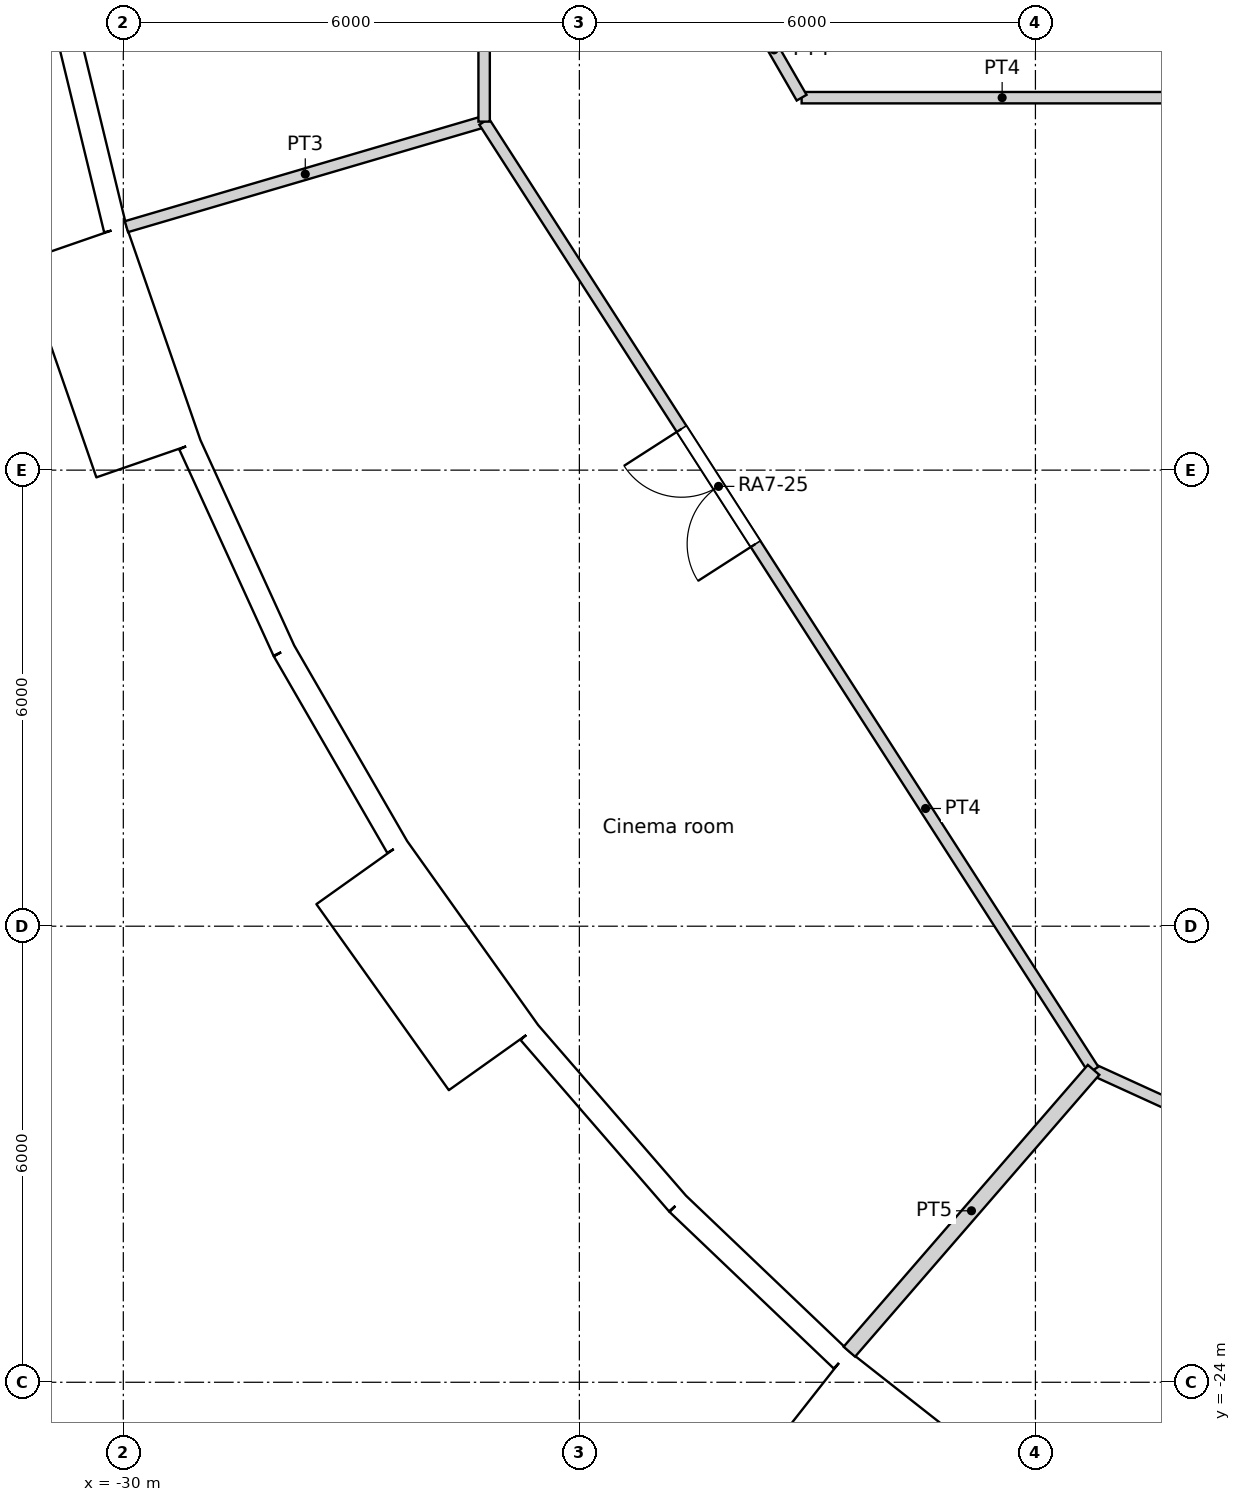
"""IFC4 building model, lengths in metres.
Left out: names, types, materials, properties, quantities, classifications, styles, units other than length and angle.
Written with IfcOpenShell. Run it as: python <this file> out.ifc"""

import sys

from ifc_helpers import new_model, si_unit, direction, frame, frame_2d, origin, origin_2d, place, context, subcontext, project, spatial, rectangle, circle, extrude, element, fill, save


model = new_model("IFC4")
c1 = context("Model", 3, precision=1e-05, world=origin(), true_north=direction((0.0, 1.0)))
c2 = subcontext(c1, "Body", "Model", "MODEL_VIEW")
j1 = project(units=[si_unit("LENGTHUNIT", "METRE"), si_unit("PLANEANGLEUNIT", "RADIAN")], contexts=[c1])
p1 = place(None, origin())
s1 = spatial("IfcSite", under=j1, at=p1, CompositionType="ELEMENT")
p2 = place(p1, origin())
s2 = spatial("IfcBuilding", under=s1, at=p2, CompositionType="ELEMENT")
p3 = place(p2, frame((0.0, 0.0, 93.0)))
s3 = spatial("IfcBuildingStorey", under=s2, at=p3, CompositionType="ELEMENT", Elevation=93.0)
for number, where, z_axis, x_axis in (
    (1, (-29.048, -8.529, 0.0), (0.0, 0.0, 1.0), (1.0, 0.0, 0.0)),
    (2, (-26.909, -13.873, 0.0), (0.0, 0.0, 1.0), (1.0, 0.0, 0.0)),
    (3, (-23.797, -18.715, 0.0), (0.0, 0.0, 1.0), (1.0, 0.0, 0.0)),
    (4, (-19.826, -22.88, 0.0), (0.0, 0.0, 1.0), (1.0, 0.0, 0.0)),
):
    element("IfcColumn", number, at=place(p3, frame(where, z_axis=z_axis, x_axis=x_axis)), inside=s3, PredefinedType="COLUMN", context=c2, shape_type="SweptSolid", body=[
        extrude(circle(Radius=0.6, at=origin_2d()), origin(), (0.0, 0.0, 1.0), 3.6),
    ])
for number, where, z_axis, x_axis in (
    (5, (-23.067, -8.396, 0.0), (0.0, 0.0, 1.0), (1.0, 0.0, 0.0)),
    (6, (-20.509, -13.489, 0.0), (0.0, 0.0, 1.0), (1.0, 0.0, 0.0)),
    (7, (-16.846, -17.855, 0.0), (0.0, 0.0, 1.0), (1.0, 0.0, 0.0)),
):
    element("IfcColumn", number, at=place(p3, frame(where, z_axis=z_axis, x_axis=x_axis)), inside=s3, PredefinedType="COLUMN", context=c2, shape_type="SweptSolid", body=[
        extrude(circle(Radius=0.65, at=origin_2d()), origin(), (0.0, 0.0, 1.0), 3.6),
    ])
p4 = place(p3, frame((-16.958, -8.167, 0.0), z_axis=(0.0, 0.0, 1.0), x_axis=(1.0, 0.0, 0.0)))
e8 = element("IfcColumn", 8, at=p4, inside=s3, PredefinedType="COLUMN", context=c2, shape_type="SweptSolid", body=[
    extrude(circle(Radius=0.7, at=origin_2d()), origin(), (0.0, 0.0, 1.0), 3.6),
])
p5 = place(p3, frame((-30.807, -5.938, 0.0), z_axis=(0.0, 0.0, 1.0), x_axis=(0.235743081534, -0.971815414319, 0.0)))
e9 = element("IfcWall", 9, at=p5, inside=s3, PredefinedType="SOLIDWALL", context=c2, shape_type="SweptSolid", body=[
    extrude(rectangle(XDim=2.979, YDim=0.3, at=frame_2d((1.49, 0.0))), origin(), (0.0, 0.0, 1.0), 3.15),
])
p6 = place(p5, frame((1.49, 0.0, 1.55)))
e10 = element("IfcOpeningElement", 10, at=p6, cuts=e9, PredefinedType="OPENING", context=c2, shape_type="SweptSolid", body=[
    extrude(circle(Radius=0.9, at=origin_2d()), frame((0.0, 0.16, 0.0), z_axis=(0.0, -1.0, 0.0), x_axis=(1.0, 0.0, 0.0)), (0.0, 0.0, 1.0), 0.32),
])
p7 = place(p3, frame((-30.649, -9.021, -0.45), z_axis=(0.0, 0.0, 1.0), x_axis=(0.327071431777, -0.944999618262, 0.0)))
e11 = element("IfcWall", 11, at=p7, inside=s3, PredefinedType="ELEMENTEDWALL", context=c2, shape_type="SweptSolid", body=[
    extrude(rectangle(XDim=3.0, YDim=1.45, at=frame_2d((1.5, 0.0))), origin(), (0.0, 0.0, 1.0), 3.6),
])
p8 = place(p7, frame((1.5, 0.0, 2.0)))
e12 = element("IfcOpeningElement", 12, at=p8, cuts=e11, PredefinedType="OPENING", context=c2, shape_type="SweptSolid", body=[
    extrude(circle(Radius=0.9, at=origin_2d()), frame((0.0, 0.735, 0.0), z_axis=(0.0, -1.0, 0.0), x_axis=(1.0, 0.0, 0.0)), (0.0, 0.0, 1.0), 1.47),
])
p9 = place(p3, frame((-29.125, -11.666, 0.0), z_axis=(0.0, 0.0, 1.0), x_axis=(0.415407317162, -0.909635509888, 0.0)))
e13 = element("IfcWall", 13, at=p9, inside=s3, PredefinedType="SOLIDWALL", context=c2, shape_type="SweptSolid", body=[
    extrude(rectangle(XDim=2.98, YDim=0.3, at=frame_2d((1.49, 0.0))), origin(), (0.0, 0.0, 1.0), 3.15),
])
p10 = place(p9, frame((1.49, 0.0, 1.55)))
e14 = element("IfcOpeningElement", 14, at=p10, cuts=e13, PredefinedType="OPENING", context=c2, shape_type="SweptSolid", body=[
    extrude(circle(Radius=0.9, at=origin_2d()), frame((0.0, 0.16, 0.0), z_axis=(0.0, -1.0, 0.0), x_axis=(1.0, 0.0, 0.0)), (0.0, 0.0, 1.0), 0.32),
])
p11 = place(p3, frame((-27.887, -14.377, 0.0), z_axis=(0.0, 0.0, 1.0), x_axis=(0.499999078476, -0.866025935826, 0.0)))
e15 = element("IfcWall", 15, at=p11, inside=s3, PredefinedType="SOLIDWALL", context=c2, shape_type="SweptSolid", body=[
    extrude(rectangle(XDim=2.979, YDim=0.3, at=frame_2d((1.49, 0.0))), origin(), (0.0, 0.0, 1.0), 3.15),
])
p12 = place(p11, frame((1.49, 0.0, 1.55)))
e16 = element("IfcOpeningElement", 16, at=p12, cuts=e15, PredefinedType="OPENING", context=c2, shape_type="SweptSolid", body=[
    extrude(circle(Radius=0.9, at=origin_2d()), frame((0.0, 0.16, 0.0), z_axis=(0.0, -1.0, 0.0), x_axis=(1.0, 0.0, 0.0)), (0.0, 0.0, 1.0), 0.32),
])
p13 = place(p3, frame((-26.866, -17.29, -0.45), z_axis=(0.0, 0.0, 1.0), x_axis=(0.580090570606, -0.814551981088, 0.0)))
e17 = element("IfcWall", 17, at=p13, inside=s3, PredefinedType="ELEMENTEDWALL", context=c2, shape_type="SweptSolid", body=[
    extrude(rectangle(XDim=3.0, YDim=1.45, at=frame_2d((1.5, 0.0))), origin(), (0.0, 0.0, 1.0), 3.6),
])
p14 = place(p13, frame((1.5, 0.0, 2.0)))
e18 = element("IfcOpeningElement", 18, at=p14, cuts=e17, PredefinedType="OPENING", context=c2, shape_type="SweptSolid", body=[
    extrude(circle(Radius=0.9, at=origin_2d()), frame((0.0, 0.735, 0.0), z_axis=(0.0, -1.0, 0.0), x_axis=(1.0, 0.0, 0.0)), (0.0, 0.0, 1.0), 1.47),
])
p15 = place(p3, frame((-24.658, -19.399, 0.0), z_axis=(0.0, 0.0, 1.0), x_axis=(0.654830712471, -0.755775587066, 0.0)))
e19 = element("IfcWall", 19, at=p15, inside=s3, PredefinedType="SOLIDWALL", context=c2, shape_type="SweptSolid", body=[
    extrude(rectangle(XDim=2.98, YDim=0.3, at=frame_2d((1.49, 0.0))), origin(), (0.0, 0.0, 1.0), 3.15),
])
p16 = place(p15, frame((1.49, 0.0, 1.55)))
e20 = element("IfcOpeningElement", 20, at=p16, cuts=e19, PredefinedType="OPENING", context=c2, shape_type="SweptSolid", body=[
    extrude(circle(Radius=0.9, at=origin_2d()), frame((0.0, 0.16, 0.0), z_axis=(0.0, -1.0, 0.0), x_axis=(1.0, 0.0, 0.0)), (0.0, 0.0, 1.0), 0.32),
])
p17 = place(p3, frame((-22.707, -21.651, 0.0), z_axis=(0.0, 0.0, 1.0), x_axis=(0.723744206617, -0.690068346896, 0.0)))
e21 = element("IfcWall", 21, at=p17, inside=s3, PredefinedType="SOLIDWALL", context=c2, shape_type="SweptSolid", body=[
    extrude(rectangle(XDim=2.98, YDim=0.3, at=frame_2d((1.49, 0.0))), origin(), (0.0, 0.0, 1.0), 3.15),
])
p18 = place(p17, frame((1.49, 0.0, 1.55)))
e22 = element("IfcOpeningElement", 22, at=p18, cuts=e21, PredefinedType="OPENING", context=c2, shape_type="SweptSolid", body=[
    extrude(circle(Radius=0.9, at=origin_2d()), frame((0.0, 0.16, 0.0), z_axis=(0.0, -1.0, 0.0), x_axis=(1.0, 0.0, 0.0)), (0.0, 0.0, 1.0), 0.32),
])
p19 = place(p3, frame((-20.907, -24.159, -0.45), z_axis=(0.0, 0.0, 1.0), x_axis=(0.786049992888, -0.618162930529, 0.0)))
e23 = element("IfcWall", 23, at=p19, inside=s3, PredefinedType="ELEMENTEDWALL", context=c2, shape_type="SweptSolid", body=[
    extrude(rectangle(XDim=3.0, YDim=1.45, at=frame_2d((1.5, 0.0))), origin(), (0.0, 0.0, 1.0), 3.6),
])
p20 = place(p19, frame((1.5, 0.0, 2.0)))
e24 = element("IfcOpeningElement", 24, at=p20, cuts=e23, PredefinedType="OPENING", context=c2, shape_type="SweptSolid", body=[
    extrude(circle(Radius=0.9, at=origin_2d()), frame((0.0, 0.735, 0.0), z_axis=(0.0, -1.0, 0.0), x_axis=(1.0, 0.0, 0.0)), (0.0, 0.0, 1.0), 1.47),
])
p21 = place(p3, frame((-21.802, -5.842, 0.0), z_axis=(0.0, 0.0, 1.0), x_axis=(0.499863102386, -0.866104427234, 0.0)))
e25 = element("IfcWall", 25, at=p21, inside=s3, PredefinedType="PARTITIONING", context=c2, shape_type="SweptSolid", body=[
    extrude(rectangle(XDim=1.453, YDim=0.15, at=frame_2d((0.726, 0.0))), origin(), (0.0, 0.0, 1.0), 3.15),
])
p22 = place(p3, frame((-21.076, -7.1, 0.0), z_axis=(0.0, 0.0, 1.0), x_axis=(1.0, 0.0, 0.0)))
e26 = element("IfcWall", 26, at=p22, inside=s3, PredefinedType="PARTITIONING", context=c2, shape_type="SweptSolid", body=[
    extrude(rectangle(XDim=5.276, YDim=0.15, at=frame_2d((2.638, 0.0))), origin(), (0.0, 0.0, 1.0), 3.15),
])
p23 = place(p3, frame((-25.253, -7.415, 0.0), z_axis=(0.0, 0.0, 1.0), x_axis=(0.0, 1.0, 0.0)))
e27 = element("IfcWall", 27, at=p23, inside=s3, PredefinedType="PARTITIONING", context=c2, shape_type="SweptSolid", body=[
    extrude(rectangle(XDim=14.83, YDim=0.15, at=frame_2d((7.415, 0.0))), origin(), (0.0, 0.0, 1.0), 3.15),
])
p24 = place(p23, frame((11.826, 0.0, 0.0)))
e28 = element("IfcOpeningElement", 28, at=p24, cuts=e27, PredefinedType="OPENING", context=c2, shape_type="SweptSolid", body=[
    extrude(rectangle(XDim=1.0, YDim=2.04, at=frame_2d((0.5, 1.02))), frame((0.0, 0.075, 0.0), z_axis=(0.0, -1.0, 0.0), x_axis=(1.0, 0.0, 0.0)), (0.0, 0.0, 1.0), 0.15),
])
p25 = place(p23, frame((5.465, 0.0, 0.0)))
e29 = element("IfcOpeningElement", 29, at=p25, cuts=e27, PredefinedType="OPENING", context=c2, shape_type="SweptSolid", body=[
    extrude(rectangle(XDim=1.0, YDim=2.04, at=frame_2d((0.5, 1.02))), frame((0.0, 0.075, 0.0), z_axis=(0.0, -1.0, 0.0), x_axis=(1.0, 0.0, 0.0)), (0.0, 0.0, 1.0), 0.15),
])
p26 = place(p3, frame((-25.253, -7.415, 0.0), z_axis=(0.0, 0.0, 1.0), x_axis=(0.540656073354, -0.841243728265, 0.0)))
e30 = element("IfcWall", 30, at=p26, inside=s3, PredefinedType="PARTITIONING", context=c2, shape_type="SweptSolid", body=[
    extrude(rectangle(XDim=14.829, YDim=0.15, at=frame_2d((7.415, 0.0))), origin(), (0.0, 0.0, 1.0), 3.15),
])
p27 = place(p26, frame((4.804, 0.0, 0.0)))
e31 = element("IfcOpeningElement", 31, at=p27, cuts=e30, PredefinedType="OPENING", context=c2, shape_type="SweptSolid", body=[
    extrude(rectangle(XDim=1.8, YDim=2.1, at=frame_2d((0.9, 1.05))), frame((0.0, 0.075, 0.0), z_axis=(0.0, -1.0, 0.0), x_axis=(1.0, 0.0, 0.0)), (0.0, 0.0, 1.0), 0.15),
])
p28 = place(p3, frame((-17.235, -19.89, 0.0), z_axis=(0.0, 0.0, 1.0), x_axis=(0.90960889055, -0.415465601743, 0.0)))
e32 = element("IfcWall", 32, at=p28, inside=s3, PredefinedType="PARTITIONING", context=c2, shape_type="SweptSolid", body=[
    extrude(rectangle(XDim=14.829, YDim=0.15, at=frame_2d((7.415, 0.0))), origin(), (0.0, 0.0, 1.0), 3.15),
])
p29 = place(p28, frame((6.939, 0.0, 0.0)))
e33 = element("IfcOpeningElement", 33, at=p29, cuts=e32, PredefinedType="OPENING", context=c2, shape_type="SweptSolid", body=[
    extrude(rectangle(XDim=0.95, YDim=2.1, at=frame_2d((0.475, 1.05))), frame((0.0, 0.075, 0.0), z_axis=(0.0, -1.0, 0.0), x_axis=(1.0, 0.0, 0.0)), (0.0, 0.0, 1.0), 0.15),
])
p30 = place(p3, frame((-29.959, -8.797, 0.0), z_axis=(0.0, 0.0, 1.0), x_axis=(0.959478767209, 0.281780934902, 0.0)))
e34 = element("IfcWall", 34, at=p30, inside=s3, PredefinedType="PARTITIONING", context=c2, shape_type="SweptSolid", body=[
    extrude(rectangle(XDim=4.905, YDim=0.15, at=frame_2d((2.452, 0.0))), origin(), (0.0, 0.0, 1.0), 3.15),
])
p31 = place(p3, frame((-20.448, -23.598, 0.0), z_axis=(0.0, 0.0, 1.0), x_axis=(0.654847179409, 0.755761319214, 0.0)))
e35 = element("IfcWall", 35, at=p31, inside=s3, PredefinedType="PARTITIONING", context=c2, shape_type="SweptSolid", body=[
    extrude(rectangle(XDim=4.906, YDim=0.2, at=frame_2d((2.453, 0.0))), origin(), (0.0, 0.0, 1.0), 3.15),
])
p32 = place(p6, origin())
e36 = element("IfcWindow", 36, at=p32, inside=s3, PartitioningType="SINGLE_PANEL", PredefinedType="WINDOW", context=c2, shape_type="SweptSolid", body=[
    extrude(circle(Radius=0.9, at=origin_2d()), frame((0.0, 0.12, 0.0), z_axis=(0.0, -1.0, 0.0), x_axis=(1.0, 0.0, 0.0)), (0.0, 0.0, 1.0), 0.1),
])
fill(e10, e36)
p33 = place(p8, origin())
e37 = element("IfcWindow", 37, at=p33, inside=s3, PartitioningType="SINGLE_PANEL", PredefinedType="WINDOW", context=c2, shape_type="SweptSolid", body=[
    extrude(circle(Radius=0.9, at=origin_2d()), frame((0.0, 0.695, 0.0), z_axis=(0.0, -1.0, 0.0), x_axis=(1.0, 0.0, 0.0)), (0.0, 0.0, 1.0), 0.1),
])
fill(e12, e37)
p34 = place(p10, origin())
e38 = element("IfcWindow", 38, at=p34, inside=s3, PartitioningType="SINGLE_PANEL", PredefinedType="WINDOW", context=c2, shape_type="SweptSolid", body=[
    extrude(circle(Radius=0.9, at=origin_2d()), frame((0.0, 0.12, 0.0), z_axis=(0.0, -1.0, 0.0), x_axis=(1.0, 0.0, 0.0)), (0.0, 0.0, 1.0), 0.1),
])
fill(e14, e38)
p35 = place(p12, origin())
e39 = element("IfcWindow", 39, at=p35, inside=s3, PartitioningType="SINGLE_PANEL", PredefinedType="WINDOW", context=c2, shape_type="SweptSolid", body=[
    extrude(circle(Radius=0.9, at=origin_2d()), frame((0.0, 0.12, 0.0), z_axis=(0.0, -1.0, 0.0), x_axis=(1.0, 0.0, 0.0)), (0.0, 0.0, 1.0), 0.1),
])
fill(e16, e39)
p36 = place(p14, origin())
e40 = element("IfcWindow", 40, at=p36, inside=s3, PartitioningType="SINGLE_PANEL", PredefinedType="WINDOW", context=c2, shape_type="SweptSolid", body=[
    extrude(circle(Radius=0.9, at=origin_2d()), frame((0.0, 0.695, 0.0), z_axis=(0.0, -1.0, 0.0), x_axis=(1.0, 0.0, 0.0)), (0.0, 0.0, 1.0), 0.1),
])
fill(e18, e40)
p37 = place(p16, origin())
e41 = element("IfcWindow", 41, at=p37, inside=s3, PartitioningType="SINGLE_PANEL", PredefinedType="WINDOW", context=c2, shape_type="SweptSolid", body=[
    extrude(circle(Radius=0.9, at=origin_2d()), frame((0.0, 0.12, 0.0), z_axis=(0.0, -1.0, 0.0), x_axis=(1.0, 0.0, 0.0)), (0.0, 0.0, 1.0), 0.1),
])
fill(e20, e41)
p38 = place(p18, origin())
e42 = element("IfcWindow", 42, at=p38, inside=s3, PartitioningType="SINGLE_PANEL", PredefinedType="WINDOW", context=c2, shape_type="SweptSolid", body=[
    extrude(circle(Radius=0.9, at=origin_2d()), frame((0.0, 0.12, 0.0), z_axis=(0.0, -1.0, 0.0), x_axis=(1.0, 0.0, 0.0)), (0.0, 0.0, 1.0), 0.1),
])
fill(e22, e42)
p39 = place(p20, origin())
e43 = element("IfcWindow", 43, at=p39, inside=s3, PartitioningType="SINGLE_PANEL", PredefinedType="WINDOW", context=c2, shape_type="SweptSolid", body=[
    extrude(circle(Radius=0.9, at=origin_2d()), frame((0.0, 0.695, 0.0), z_axis=(0.0, -1.0, 0.0), x_axis=(1.0, 0.0, 0.0)), (0.0, 0.0, 1.0), 0.1),
])
fill(e24, e43)
p40 = place(p27, origin())
e44 = element("IfcDoor", 44, at=p40, inside=s3, OperationType="DOUBLE_DOOR_SINGLE_SWING", PredefinedType="DOOR", context=c2, shape_type="SweptSolid", body=[
    extrude(rectangle(XDim=1.8, YDim=2.1, at=frame_2d((0.9, 1.05))), frame((0.0, 0.025, 0.0), z_axis=(0.0, -1.0, 0.0), x_axis=(1.0, 0.0, 0.0)), (0.0, 0.0, 1.0), 0.05),
])
fill(e31, e44)
save(model, sys.argv[1])
